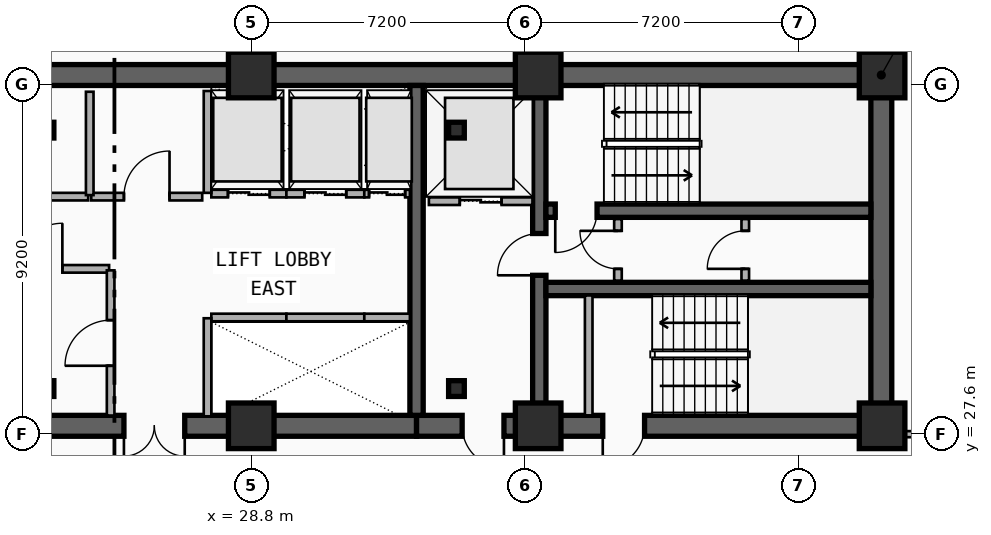
"""IFC4 building model, lengths in metres.
Left out: names, types, materials, properties, quantities, classifications, styles, units other than length and angle.
Written with IfcOpenShell. Run it as: python <this file> out.ifc"""

import sys

from ifc_helpers import new_model, si_unit, direction, frame, frame_2d, origin, origin_2d, place, context, subcontext, project, spatial, rectangle, i_section, extrude, element, fill, save


model = new_model("IFC4")
c1 = context("Model", 3, precision=1e-05, world=origin(), true_north=direction((0.0, 1.0)))
c2 = subcontext(c1, "Body", "Model", "MODEL_VIEW")
j1 = project(units=[si_unit("LENGTHUNIT", "METRE"), si_unit("PLANEANGLEUNIT", "RADIAN")], contexts=[c1])
p1 = place(None, origin())
s1 = spatial("IfcSite", under=j1, at=p1, CompositionType="ELEMENT")
p2 = place(p1, origin())
s2 = spatial("IfcBuilding", under=s1, at=p2, CompositionType="ELEMENT")
p3 = place(p2, frame((0.0, 0.0, 159.0)))
s3 = spatial("IfcBuildingStorey", under=s2, at=p3, CompositionType="ELEMENT", Elevation=159.0)
p4 = place(p3, frame((12.15, 37.05, 0.0), z_axis=(0.0, 0.0, 1.0), x_axis=(1.0, 0.0, 0.0)))
e1 = element("IfcWall", 1, at=p4, inside=s3, PredefinedType="SHEAR", context=c2, shape_type="SweptSolid", body=[
    extrude(rectangle(XDim=33.23, YDim=0.55, at=frame_2d((16.615, 0.0))), origin(), (0.0, 0.0, 1.0), 3.55),
])
p5 = place(p3, frame((33.15, 27.82, 0.0), z_axis=(0.0, 0.0, 1.0), x_axis=(-1.0, 0.0, 0.0)))
e2 = element("IfcWall", 2, at=p5, inside=s3, PredefinedType="SHEAR", context=c2, shape_type="SweptSolid", body=[
    extrude(rectangle(XDim=11.97, YDim=0.55, at=frame_2d((5.985, 0.0))), origin(), (0.0, 0.0, 1.0), 3.55),
])
p6 = place(p5, frame((6.1, 0.0, 0.0)))
e3 = element("IfcOpeningElement", 3, at=p6, cuts=e2, PredefinedType="OPENING", context=c2, shape_type="SweptSolid", body=[
    extrude(rectangle(XDim=1.6, YDim=2.2, at=frame_2d((0.8, 1.1))), frame((0.0, 0.285, 0.0), z_axis=(0.0, -1.0, 0.0), x_axis=(1.0, 0.0, 0.0)), (0.0, 0.0, 1.0), 0.57),
])
p7 = place(p3, frame((45.38, 27.82, 0.0), z_axis=(0.0, 0.0, 1.0), x_axis=(-1.0, 0.0, 0.0)))
e4 = element("IfcWall", 4, at=p7, inside=s3, PredefinedType="SHEAR", context=c2, shape_type="SweptSolid", body=[
    extrude(rectangle(XDim=12.23, YDim=0.55, at=frame_2d((6.115, 0.0))), origin(), (0.0, 0.0, 1.0), 3.55),
])
p8 = place(p7, frame((9.93, 0.0, 0.0)))
e5 = element("IfcOpeningElement", 5, at=p8, cuts=e4, PredefinedType="OPENING", context=c2, shape_type="SweptSolid", body=[
    extrude(rectangle(XDim=1.1, YDim=2.15, at=frame_2d((0.55, 1.075))), frame((0.0, 0.285, 0.0), z_axis=(0.0, -1.0, 0.0), x_axis=(1.0, 0.0, 0.0)), (0.0, 0.0, 1.0), 0.57),
])
p9 = place(p7, frame((6.23, 0.0, 0.0)))
e6 = element("IfcOpeningElement", 6, at=p9, cuts=e4, PredefinedType="OPENING", context=c2, shape_type="SweptSolid", body=[
    extrude(rectangle(XDim=1.1, YDim=2.15, at=frame_2d((0.55, 1.075))), frame((0.0, 0.285, 0.0), z_axis=(0.0, -1.0, 0.0), x_axis=(1.0, 0.0, 0.0)), (0.0, 0.0, 1.0), 0.57),
])
p10 = place(p3, frame((45.38, 28.095, 0.0), z_axis=(0.0, 0.0, 1.0), x_axis=(0.0, 1.0, 0.0)))
e7 = element("IfcWall", 7, at=p10, inside=s3, PredefinedType="SHEAR", context=c2, shape_type="SweptSolid", body=[
    extrude(rectangle(XDim=8.68, YDim=0.55, at=frame_2d((4.34, 0.0))), origin(), (0.0, 0.0, 1.0), 3.55),
])
p11 = place(p3, frame((33.15, 28.095, 0.0), z_axis=(0.0, 0.0, 1.0), x_axis=(0.0, 1.0, 0.0)))
e8 = element("IfcWall", 8, at=p11, inside=s3, PredefinedType="SHEAR", context=c2, shape_type="SweptSolid", body=[
    extrude(rectangle(XDim=8.68, YDim=0.35, at=frame_2d((4.34, 0.0))), origin(), (0.0, 0.0, 1.0), 3.55),
])
p12 = place(p3, frame((36.38, 28.095, 0.0), z_axis=(0.0, 0.0, 1.0), x_axis=(0.0, 1.0, 0.0)))
e9 = element("IfcWall", 9, at=p12, inside=s3, PredefinedType="SHEAR", context=c2, shape_type="SweptSolid", body=[
    extrude(rectangle(XDim=8.68, YDim=0.35, at=frame_2d((4.34, 0.0))), origin(), (0.0, 0.0, 1.0), 3.55),
])
p13 = place(p12, frame((3.685, 0.0, 0.0)))
e10 = element("IfcOpeningElement", 10, at=p13, cuts=e9, PredefinedType="OPENING", context=c2, shape_type="SweptSolid", body=[
    extrude(rectangle(XDim=1.1, YDim=2.15, at=frame_2d((0.55, 1.075))), frame((0.0, 0.185, 0.0), z_axis=(0.0, -1.0, 0.0), x_axis=(1.0, 0.0, 0.0)), (0.0, 0.0, 1.0), 0.37),
])
p14 = place(p3, frame((45.105, 33.48, 0.0), z_axis=(0.0, 0.0, 1.0), x_axis=(-1.0, 0.0, 0.0)))
e11 = element("IfcWall", 11, at=p14, inside=s3, PredefinedType="SHEAR", context=c2, shape_type="SweptSolid", body=[
    extrude(rectangle(XDim=8.55, YDim=0.35, at=frame_2d((4.275, 0.0))), origin(), (0.0, 0.0, 1.0), 3.55),
])
p15 = place(p14, frame((7.205, 0.0, 0.0)))
e12 = element("IfcOpeningElement", 12, at=p15, cuts=e11, PredefinedType="OPENING", context=c2, shape_type="SweptSolid", body=[
    extrude(rectangle(XDim=1.1, YDim=2.15, at=frame_2d((0.55, 1.075))), frame((0.0, 0.185, 0.0), z_axis=(0.0, -1.0, 0.0), x_axis=(1.0, 0.0, 0.0)), (0.0, 0.0, 1.0), 0.37),
])
p16 = place(p3, frame((36.555, 31.42, 0.0), z_axis=(0.0, 0.0, 1.0), x_axis=(1.0, 0.0, 0.0)))
e13 = element("IfcWall", 13, at=p16, inside=s3, PredefinedType="SHEAR", context=c2, shape_type="SweptSolid", body=[
    extrude(rectangle(XDim=8.55, YDim=0.35, at=frame_2d((4.275, 0.0))), origin(), (0.0, 0.0, 1.0), 3.55),
])
for number, where, z_axis, x_axis in (
    (14, (23.4, 28.8, 0.0), (0.0, 0.0, 1.0), (1.0, 0.0, 0.0)),
    (15, (34.2, 28.8, 0.0), (0.0, 0.0, 1.0), (1.0, 0.0, 0.0)),
    (16, (34.2, 35.6, 0.0), (0.0, 0.0, 1.0), (1.0, 0.0, 0.0)),
    (17, (23.4, 35.6, 0.0), (0.0, 0.0, 1.0), (1.0, 0.0, 0.0)),
):
    element("IfcColumn", number, at=place(p3, frame(where, z_axis=z_axis, x_axis=x_axis)), inside=s3, PredefinedType="COLUMN", context=c2, shape_type="SweptSolid", body=[
        extrude(i_section(OverallWidth=0.413, OverallDepth=0.415, WebThickness=0.03, FlangeThickness=0.047, FilletRadius=0.015, at=origin_2d()), origin(), (0.0, 0.0, 1.0), 3.55),
    ])
for number, where, z_axis, x_axis in (
    (18, (28.8, 27.82, 0.0), (0.0, 0.0, 1.0), (1.0, 0.0, 0.0)),
    (19, (28.8, 37.05, 0.0), (0.0, 0.0, 1.0), (1.0, 0.0, 0.0)),
    (20, (36.35, 27.82, 0.0), (0.0, 0.0, 1.0), (1.0, 0.0, 0.0)),
    (21, (36.35, 37.05, 0.0), (0.0, 0.0, 1.0), (1.0, 0.0, 0.0)),
    (22, (45.4, 27.82, 0.0), (0.0, 0.0, 1.0), (1.0, 0.0, 0.0)),
    (23, (45.4, 37.05, 0.0), (0.0, 0.0, 1.0), (1.0, 0.0, 0.0)),
):
    element("IfcColumn", number, at=place(p3, frame(where, z_axis=z_axis, x_axis=x_axis)), inside=s3, PredefinedType="COLUMN", context=c2, shape_type="SweptSolid", body=[
        extrude(rectangle(XDim=1.2, YDim=1.2, at=origin_2d()), origin(), (0.0, 0.0, 1.0), 3.55),
    ])
p17 = place(p3, frame((33.475, 33.73, 0.0), z_axis=(0.0, 0.0, 1.0), x_axis=(1.0, 0.0, 0.0)))
e24 = element("IfcWall", 24, at=p17, inside=s3, PredefinedType="PARTITIONING", context=c2, shape_type="SweptSolid", body=[
    extrude(rectangle(XDim=2.725, YDim=0.2, at=frame_2d((1.362, 0.0))), origin(), (0.0, 0.0, 1.0), 2.36),
])
p18 = place(p17, frame((0.812, 0.0, 0.0)))
e25 = element("IfcOpeningElement", 25, at=p18, cuts=e24, PredefinedType="OPENING", context=c2, shape_type="SweptSolid", body=[
    extrude(rectangle(XDim=1.1, YDim=2.15, at=frame_2d((0.55, 1.075))), frame((0.0, 0.11, 0.0), z_axis=(0.0, -1.0, 0.0), x_axis=(1.0, 0.0, 0.0)), (0.0, 0.0, 1.0), 0.22),
])
p19 = place(p3, frame((27.75, 30.67, 0.0), z_axis=(0.0, 0.0, 1.0), x_axis=(1.0, 0.0, 0.0)))
e26 = element("IfcWall", 26, at=p19, inside=s3, PredefinedType="PARTITIONING", context=c2, shape_type="SweptSolid", body=[
    extrude(rectangle(XDim=1.975, YDim=0.2, at=frame_2d((0.988, 0.0))), origin(), (0.0, 0.0, 1.0), 2.36),
])
p20 = place(p3, frame((27.65, 28.07, 0.0), z_axis=(0.0, 0.0, 1.0), x_axis=(0.0, 1.0, 0.0)))
e27 = element("IfcWall", 27, at=p20, inside=s3, PredefinedType="PARTITIONING", context=c2, shape_type="SweptSolid", body=[
    extrude(rectangle(XDim=2.58, YDim=0.2, at=frame_2d((1.29, 0.0))), origin(), (0.0, 0.0, 1.0), 2.36),
])
p21 = place(p3, frame((29.725, 30.67, 0.0), z_axis=(0.0, 0.0, 1.0), x_axis=(1.0, 0.0, 0.0)))
e28 = element("IfcWall", 28, at=p21, inside=s3, PredefinedType="PARTITIONING", context=c2, shape_type="SweptSolid", body=[
    extrude(rectangle(XDim=2.05, YDim=0.2, at=frame_2d((1.025, 0.0))), origin(), (0.0, 0.0, 1.0), 2.67),
])
p22 = place(p3, frame((31.775, 30.67, 0.0), z_axis=(0.0, 0.0, 1.0), x_axis=(1.0, 0.0, 0.0)))
e29 = element("IfcWall", 29, at=p22, inside=s3, PredefinedType="PARTITIONING", context=c2, shape_type="SweptSolid", body=[
    extrude(rectangle(XDim=1.2, YDim=0.2, at=frame_2d((0.6, 0.0))), origin(), (0.0, 0.0, 1.0), 2.67),
])
p23 = place(p3, frame((27.75, 33.93, 0.0), z_axis=(0.0, 0.0, 1.0), x_axis=(1.0, 0.0, 0.0)))
e30 = element("IfcWall", 30, at=p23, inside=s3, PredefinedType="PARTITIONING", context=c2, shape_type="SweptSolid", body=[
    extrude(rectangle(XDim=1.975, YDim=0.2, at=frame_2d((0.988, 0.0))), origin(), (0.0, 0.0, 1.0), 2.36),
])
p24 = place(p23, frame((0.438, 0.0, 0.0)))
e31 = element("IfcOpeningElement", 31, at=p24, cuts=e30, PredefinedType="OPENING", context=c2, shape_type="SweptSolid", body=[
    extrude(rectangle(XDim=1.1, YDim=2.15, at=frame_2d((0.55, 1.075))), frame((0.0, 0.11, 0.0), z_axis=(0.0, -1.0, 0.0), x_axis=(1.0, 0.0, 0.0)), (0.0, 0.0, 1.0), 0.22),
])
p25 = place(p3, frame((27.65, 33.95, 0.0), z_axis=(0.0, 0.0, 1.0), x_axis=(0.0, 1.0, 0.0)))
e32 = element("IfcWall", 32, at=p25, inside=s3, PredefinedType="PARTITIONING", context=c2, shape_type="SweptSolid", body=[
    extrude(rectangle(XDim=2.68, YDim=0.2, at=frame_2d((1.34, 0.0))), origin(), (0.0, 0.0, 1.0), 2.36),
])
p26 = place(p3, frame((29.725, 33.93, 0.0), z_axis=(0.0, 0.0, 1.0), x_axis=(1.0, 0.0, 0.0)))
e33 = element("IfcWall", 33, at=p26, inside=s3, PredefinedType="PARTITIONING", context=c2, shape_type="SweptSolid", body=[
    extrude(rectangle(XDim=2.05, YDim=0.2, at=frame_2d((1.025, 0.0))), origin(), (0.0, 0.0, 1.0), 3.29),
])
p27 = place(p26, frame((0.475, 0.0, 0.0)))
e34 = element("IfcOpeningElement", 34, at=p27, cuts=e33, PredefinedType="OPENING", context=c2, shape_type="SweptSolid", body=[
    extrude(rectangle(XDim=1.1, YDim=2.15, at=frame_2d((0.55, 1.075))), frame((0.0, 0.11, 0.0), z_axis=(0.0, -1.0, 0.0), x_axis=(1.0, 0.0, 0.0)), (0.0, 0.0, 1.0), 0.22),
])
p28 = place(p3, frame((31.775, 33.93, 0.0), z_axis=(0.0, 0.0, 1.0), x_axis=(1.0, 0.0, 0.0)))
e35 = element("IfcWall", 35, at=p28, inside=s3, PredefinedType="PARTITIONING", context=c2, shape_type="SweptSolid", body=[
    extrude(rectangle(XDim=1.2, YDim=0.2, at=frame_2d((0.6, 0.0))), origin(), (0.0, 0.0, 1.0), 3.29),
])
p29 = place(p28, frame((0.125, 0.0, 0.0)))
e36 = element("IfcOpeningElement", 36, at=p29, cuts=e35, PredefinedType="OPENING", context=c2, shape_type="SweptSolid", body=[
    extrude(rectangle(XDim=0.95, YDim=2.15, at=frame_2d((0.475, 1.075))), frame((0.0, 0.11, 0.0), z_axis=(0.0, -1.0, 0.0), x_axis=(1.0, 0.0, 0.0)), (0.0, 0.0, 1.0), 0.22),
])
p30 = place(p3, frame((37.68, 28.095, 0.0), z_axis=(0.0, 0.0, 1.0), x_axis=(0.0, 1.0, 0.0)))
e37 = element("IfcWall", 37, at=p30, inside=s3, PredefinedType="PARTITIONING", context=c2, shape_type="SweptSolid", body=[
    extrude(rectangle(XDim=3.155, YDim=0.2, at=frame_2d((1.578, 0.0))), origin(), (0.0, 0.0, 1.0), 2.67),
])
p31 = place(p3, frame((38.45, 31.64, 0.0), z_axis=(0.0, 0.0, 1.0), x_axis=(0.0, 1.0, 0.0)))
e38 = element("IfcWall", 38, at=p31, inside=s3, PredefinedType="PARTITIONING", context=c2, shape_type="SweptSolid", body=[
    extrude(rectangle(XDim=1.62, YDim=0.2, at=frame_2d((0.81, 0.0))), origin(), (0.0, 0.0, 1.0), 3.29),
])
p32 = place(p31, frame((0.31, 0.0, 0.0)))
e39 = element("IfcOpeningElement", 39, at=p32, cuts=e38, PredefinedType="OPENING", context=c2, shape_type="SweptSolid", body=[
    extrude(rectangle(XDim=1.0, YDim=2.15, at=frame_2d((0.5, 1.075))), frame((0.0, 0.11, 0.0), z_axis=(0.0, -1.0, 0.0), x_axis=(1.0, 0.0, 0.0)), (0.0, 0.0, 1.0), 0.22),
])
p33 = place(p3, frame((41.8, 31.64, 0.0), z_axis=(0.0, 0.0, 1.0), x_axis=(0.0, 1.0, 0.0)))
e40 = element("IfcWall", 40, at=p33, inside=s3, PredefinedType="PARTITIONING", context=c2, shape_type="SweptSolid", body=[
    extrude(rectangle(XDim=1.62, YDim=0.2, at=frame_2d((0.81, 0.0))), origin(), (0.0, 0.0, 1.0), 3.29),
])
p34 = place(p33, frame((0.31, 0.0, 0.0)))
e41 = element("IfcOpeningElement", 41, at=p34, cuts=e40, PredefinedType="OPENING", context=c2, shape_type="SweptSolid", body=[
    extrude(rectangle(XDim=1.0, YDim=2.15, at=frame_2d((0.5, 1.075))), frame((0.0, 0.11, 0.0), z_axis=(0.0, -1.0, 0.0), x_axis=(1.0, 0.0, 0.0)), (0.0, 0.0, 1.0), 0.22),
])
p35 = place(p3, frame((21.4, 31.95, 0.0), z_axis=(0.0, 0.0, 1.0), x_axis=(1.0, 0.0, 0.0)))
e42 = element("IfcWall", 42, at=p35, inside=s3, PredefinedType="PARTITIONING", context=c2, shape_type="SweptSolid", body=[
    extrude(rectangle(XDim=3.66, YDim=0.2, at=frame_2d((1.83, 0.0))), origin(), (0.0, 0.0, 1.0), 2.36),
])
p36 = place(p35, frame((1.23, 0.0, 0.0)))
e43 = element("IfcOpeningElement", 43, at=p36, cuts=e42, PredefinedType="OPENING", context=c2, shape_type="SweptSolid", body=[
    extrude(rectangle(XDim=1.2, YDim=2.15, at=frame_2d((0.6, 1.075))), frame((0.0, 0.11, 0.0), z_axis=(0.0, -1.0, 0.0), x_axis=(1.0, 0.0, 0.0)), (0.0, 0.0, 1.0), 0.22),
])
p37 = place(p3, frame((21.59, 33.85, 0.0), z_axis=(0.0, 0.0, 1.0), x_axis=(1.0, 0.0, 0.0)))
e44 = element("IfcWall", 44, at=p37, inside=s3, PredefinedType="PARTITIONING", context=c2, shape_type="SweptSolid", body=[
    extrude(rectangle(XDim=2.92, YDim=0.2, at=frame_2d((1.46, 0.0))), origin(), (0.0, 0.0, 1.0), 2.36),
])
p38 = place(p37, frame((0.2, 0.0, 0.0)))
e45 = element("IfcOpeningElement", 45, at=p38, cuts=e44, PredefinedType="OPENING", context=c2, shape_type="SweptSolid", body=[
    extrude(rectangle(XDim=1.2, YDim=2.15, at=frame_2d((0.6, 1.075))), frame((0.0, 0.11, 0.0), z_axis=(0.0, -1.0, 0.0), x_axis=(1.0, 0.0, 0.0)), (0.0, 0.0, 1.0), 0.22),
])
p39 = place(p3, frame((24.59, 33.85, 0.0), z_axis=(0.0, 0.0, 1.0), x_axis=(1.0, 0.0, 0.0)))
e46 = element("IfcWall", 46, at=p39, inside=s3, PredefinedType="PARTITIONING", context=c2, shape_type="SweptSolid", body=[
    extrude(rectangle(XDim=2.92, YDim=0.2, at=frame_2d((1.46, 0.0))), origin(), (0.0, 0.0, 1.0), 3.29),
])
p40 = place(p39, frame((0.86, 0.0, 0.0)))
e47 = element("IfcOpeningElement", 47, at=p40, cuts=e46, PredefinedType="OPENING", context=c2, shape_type="SweptSolid", body=[
    extrude(rectangle(XDim=1.2, YDim=2.15, at=frame_2d((0.6, 1.075))), frame((0.0, 0.11, 0.0), z_axis=(0.0, -1.0, 0.0), x_axis=(1.0, 0.0, 0.0)), (0.0, 0.0, 1.0), 0.22),
])
p41 = place(p3, frame((25.1, 28.09, 0.0), z_axis=(0.0, 0.0, 1.0), x_axis=(0.0, 1.0, 0.0)))
e48 = element("IfcWall", 48, at=p41, inside=s3, PredefinedType="PARTITIONING", context=c2, shape_type="SweptSolid", body=[
    extrude(rectangle(XDim=3.82, YDim=0.2, at=frame_2d((1.91, 0.0))), origin(), (0.0, 0.0, 1.0), 2.67),
])
p42 = place(p41, frame((1.31, 0.0, 0.0)))
e49 = element("IfcOpeningElement", 49, at=p42, cuts=e48, PredefinedType="OPENING", context=c2, shape_type="SweptSolid", body=[
    extrude(rectangle(XDim=1.2, YDim=2.15, at=frame_2d((0.6, 1.075))), frame((0.0, 0.11, 0.0), z_axis=(0.0, -1.0, 0.0), x_axis=(1.0, 0.0, 0.0)), (0.0, 0.0, 1.0), 0.22),
])
p43 = place(p3, frame((24.55, 33.89, 0.0), z_axis=(0.0, 0.0, 1.0), x_axis=(0.0, 1.0, 0.0)))
e50 = element("IfcWall", 50, at=p43, inside=s3, PredefinedType="PARTITIONING", context=c2, shape_type="SweptSolid", body=[
    extrude(rectangle(XDim=2.72, YDim=0.2, at=frame_2d((1.36, 0.0))), origin(), (0.0, 0.0, 1.0), 3.29),
])
p44 = place(p3, frame((45.41, 27.6, 0.0), z_axis=(0.0, 0.0, 1.0), x_axis=(1.0, 0.0, 0.0)))
e51 = element("IfcWall", 51, at=p44, inside=s3, PredefinedType="PARTITIONING", context=c2, shape_type="SweptSolid", body=[
    extrude(rectangle(XDim=0.91, YDim=0.16, at=frame_2d((0.455, 0.0))), origin(), (0.0, 0.0, 1.0), 2.36),
])
p45 = place(p18, origin())
e52 = element("IfcDoor", 52, at=p45, inside=s3, OperationType="DOUBLE_DOOR_SLIDING", PredefinedType="DOOR", context=c2, shape_type="SweptSolid", body=[
    extrude(rectangle(XDim=1.1, YDim=2.15, at=frame_2d((0.55, 1.075))), frame((0.0, 0.025, 0.0), z_axis=(0.0, -1.0, 0.0), x_axis=(1.0, 0.0, 0.0)), (0.0, 0.0, 1.0), 0.05),
])
fill(e25, e52)
p46 = place(p24, origin())
e53 = element("IfcDoor", 53, at=p46, inside=s3, OperationType="DOUBLE_DOOR_SLIDING", PredefinedType="DOOR", context=c2, shape_type="SweptSolid", body=[
    extrude(rectangle(XDim=1.1, YDim=2.15, at=frame_2d((0.55, 1.075))), frame((0.0, 0.025, 0.0), z_axis=(0.0, -1.0, 0.0), x_axis=(1.0, 0.0, 0.0)), (0.0, 0.0, 1.0), 0.05),
])
fill(e31, e53)
p47 = place(p27, origin())
e54 = element("IfcDoor", 54, at=p47, inside=s3, OperationType="DOUBLE_DOOR_SLIDING", PredefinedType="DOOR", context=c2, shape_type="SweptSolid", body=[
    extrude(rectangle(XDim=1.1, YDim=2.15, at=frame_2d((0.55, 1.075))), frame((0.0, 0.025, 0.0), z_axis=(0.0, -1.0, 0.0), x_axis=(1.0, 0.0, 0.0)), (0.0, 0.0, 1.0), 0.05),
])
fill(e34, e54)
p48 = place(p29, origin())
e55 = element("IfcDoor", 55, at=p48, inside=s3, OperationType="DOUBLE_DOOR_SLIDING", PredefinedType="DOOR", context=c2, shape_type="SweptSolid", body=[
    extrude(rectangle(XDim=0.95, YDim=2.15, at=frame_2d((0.475, 1.075))), frame((0.0, 0.025, 0.0), z_axis=(0.0, -1.0, 0.0), x_axis=(1.0, 0.0, 0.0)), (0.0, 0.0, 1.0), 0.05),
])
fill(e36, e55)
p49 = place(p15, origin())
e56 = element("IfcDoor", 56, at=p49, inside=s3, OperationType="SINGLE_SWING_RIGHT", PredefinedType="DOOR", context=c2, shape_type="SweptSolid", body=[
    extrude(rectangle(XDim=1.1, YDim=2.15, at=frame_2d((0.55, 1.075))), frame((0.0, 0.025, 0.0), z_axis=(0.0, -1.0, 0.0), x_axis=(1.0, 0.0, 0.0)), (0.0, 0.0, 1.0), 0.05),
])
fill(e12, e56)
p50 = place(p13, origin())
e57 = element("IfcDoor", 57, at=p50, inside=s3, OperationType="SINGLE_SWING_LEFT", PredefinedType="DOOR", context=c2, shape_type="SweptSolid", body=[
    extrude(rectangle(XDim=1.1, YDim=2.15, at=frame_2d((0.55, 1.075))), frame((0.0, 0.025, 0.0), z_axis=(0.0, -1.0, 0.0), x_axis=(1.0, 0.0, 0.0)), (0.0, 0.0, 1.0), 0.05),
])
fill(e10, e57)
p51 = place(p8, origin())
e58 = element("IfcDoor", 58, at=p51, inside=s3, OperationType="SINGLE_SWING_LEFT", PredefinedType="DOOR", context=c2, shape_type="SweptSolid", body=[
    extrude(rectangle(XDim=1.1, YDim=2.15, at=frame_2d((0.55, 1.075))), frame((0.0, 0.025, 0.0), z_axis=(0.0, -1.0, 0.0), x_axis=(1.0, 0.0, 0.0)), (0.0, 0.0, 1.0), 0.05),
])
fill(e5, e58)
p52 = place(p9, origin())
e59 = element("IfcDoor", 59, at=p52, inside=s3, OperationType="SINGLE_SWING_RIGHT", PredefinedType="DOOR", context=c2, shape_type="SweptSolid", body=[
    extrude(rectangle(XDim=1.1, YDim=2.15, at=frame_2d((0.55, 1.075))), frame((0.0, 0.025, 0.0), z_axis=(0.0, -1.0, 0.0), x_axis=(1.0, 0.0, 0.0)), (0.0, 0.0, 1.0), 0.05),
])
fill(e6, e59)
p53 = place(p6, origin())
e60 = element("IfcDoor", 60, at=p53, inside=s3, OperationType="SINGLE_SWING_LEFT", PredefinedType="DOOR", context=c2, shape_type="SweptSolid", body=[
    extrude(rectangle(XDim=1.6, YDim=2.2, at=frame_2d((0.8, 1.1))), frame((0.0, 0.025, 0.0), z_axis=(0.0, -1.0, 0.0), x_axis=(1.0, 0.0, 0.0)), (0.0, 0.0, 1.0), 0.05),
])
fill(e3, e60)
p54 = place(p32, origin())
e61 = element("IfcDoor", 61, at=p54, inside=s3, OperationType="SINGLE_SWING_RIGHT", PredefinedType="DOOR", context=c2, shape_type="SweptSolid", body=[
    extrude(rectangle(XDim=1.0, YDim=2.15, at=frame_2d((0.5, 1.075))), frame((0.0, 0.025, 0.0), z_axis=(0.0, -1.0, 0.0), x_axis=(1.0, 0.0, 0.0)), (0.0, 0.0, 1.0), 0.05),
])
fill(e39, e61)
p55 = place(p34, origin())
e62 = element("IfcDoor", 62, at=p55, inside=s3, OperationType="SINGLE_SWING_LEFT", PredefinedType="DOOR", context=c2, shape_type="SweptSolid", body=[
    extrude(rectangle(XDim=1.0, YDim=2.15, at=frame_2d((0.5, 1.075))), frame((0.0, 0.025, 0.0), z_axis=(0.0, -1.0, 0.0), x_axis=(1.0, 0.0, 0.0)), (0.0, 0.0, 1.0), 0.05),
])
fill(e41, e62)
p56 = place(p36, origin())
e63 = element("IfcDoor", 63, at=p56, inside=s3, OperationType="SINGLE_SWING_RIGHT", PredefinedType="DOOR", context=c2, shape_type="SweptSolid", body=[
    extrude(rectangle(XDim=1.2, YDim=2.15, at=frame_2d((0.6, 1.075))), frame((0.0, 0.025, 0.0), z_axis=(0.0, -1.0, 0.0), x_axis=(1.0, 0.0, 0.0)), (0.0, 0.0, 1.0), 0.05),
])
fill(e43, e63)
p57 = place(p40, origin())
e64 = element("IfcDoor", 64, at=p57, inside=s3, OperationType="SINGLE_SWING_RIGHT", PredefinedType="DOOR", context=c2, shape_type="SweptSolid", body=[
    extrude(rectangle(XDim=1.2, YDim=2.15, at=frame_2d((0.6, 1.075))), frame((0.0, 0.025, 0.0), z_axis=(0.0, -1.0, 0.0), x_axis=(1.0, 0.0, 0.0)), (0.0, 0.0, 1.0), 0.05),
])
fill(e47, e64)
p58 = place(p42, origin())
e65 = element("IfcDoor", 65, at=p58, inside=s3, OperationType="SINGLE_SWING_LEFT", PredefinedType="DOOR", context=c2, shape_type="SweptSolid", body=[
    extrude(rectangle(XDim=1.2, YDim=2.15, at=frame_2d((0.6, 1.075))), frame((0.0, 0.025, 0.0), z_axis=(0.0, -1.0, 0.0), x_axis=(1.0, 0.0, 0.0)), (0.0, 0.0, 1.0), 0.05),
])
fill(e49, e65)
save(model, sys.argv[1])
